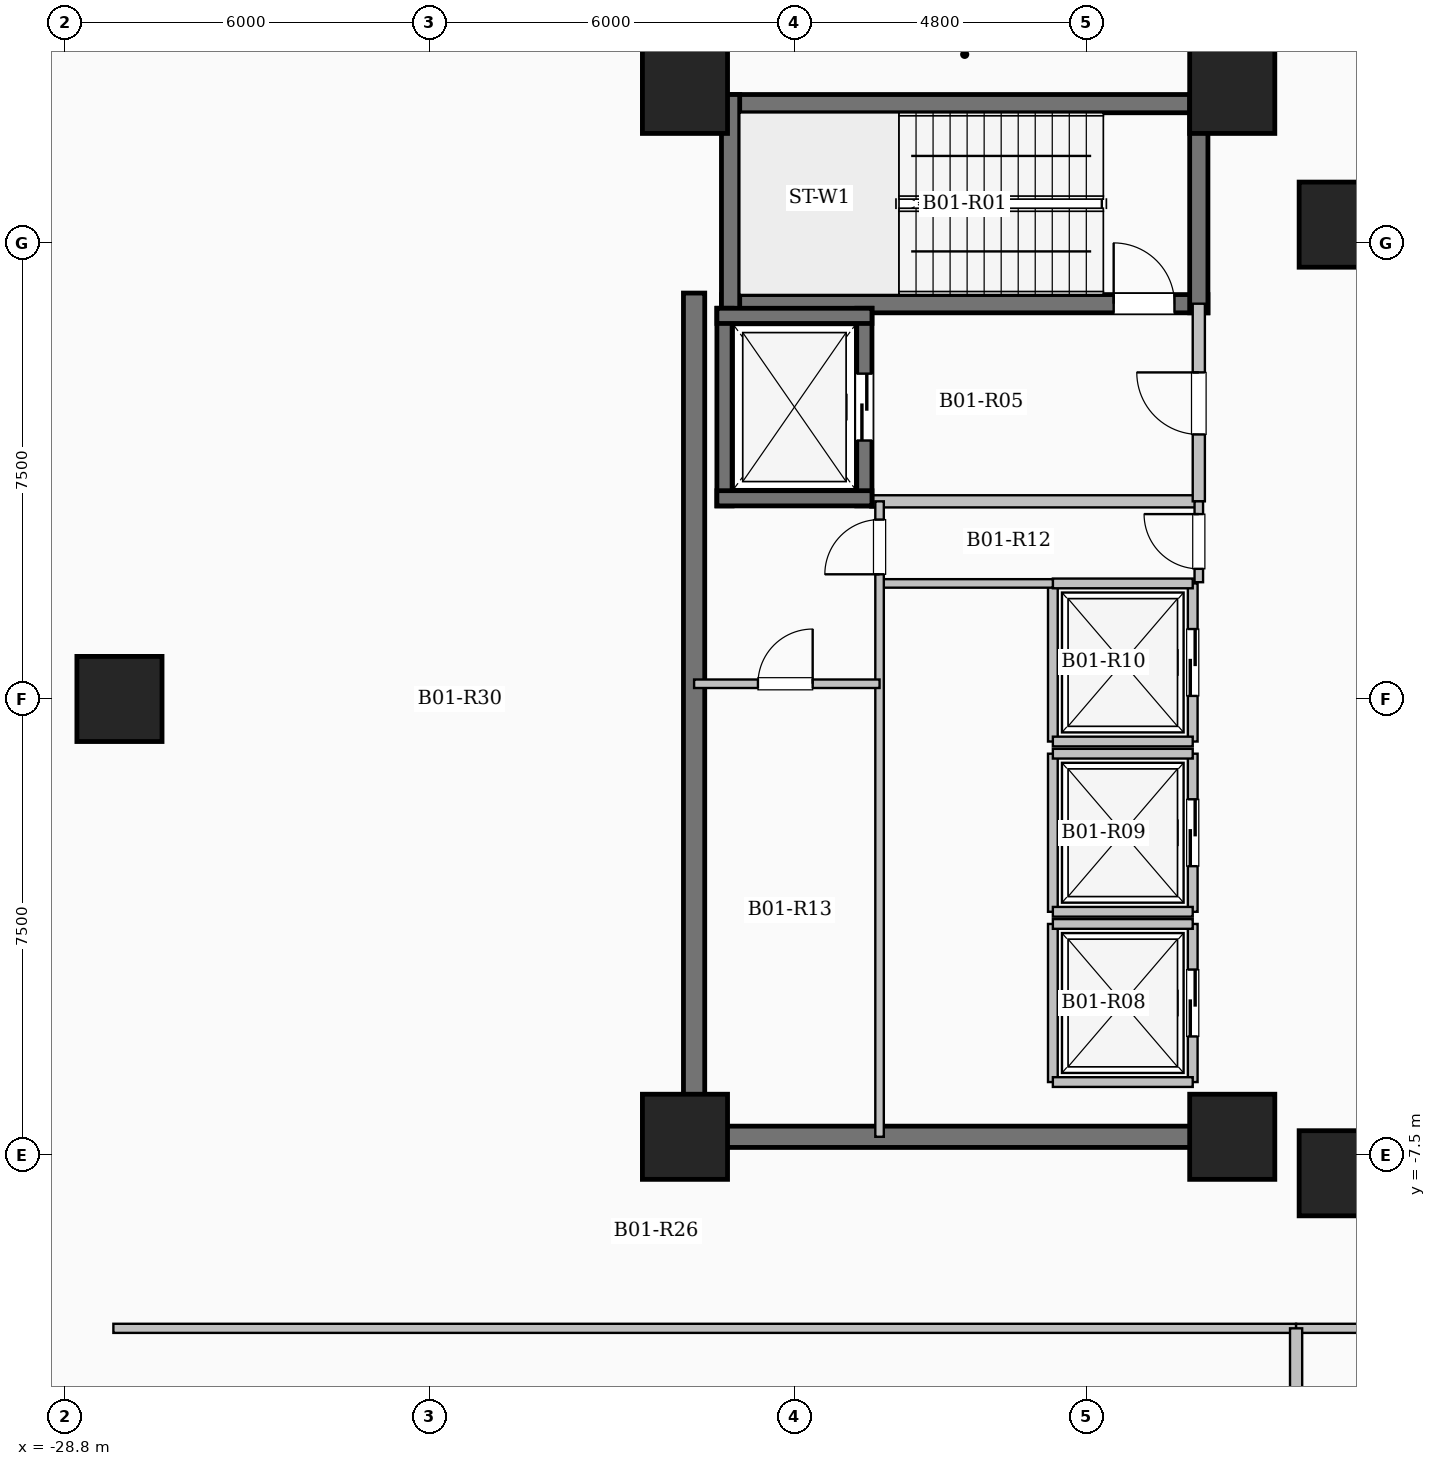
"""IFC4 building model, lengths in metres.
Left out: names, types, materials, properties, quantities, classifications, styles, units other than length and angle.
Written with IfcOpenShell. Run it as: python <this file> out.ifc"""

import sys

from ifc_helpers import new_model, si_unit, direction, frame, frame_2d, origin, origin_2d, place, context, subcontext, project, spatial, rectangle, extrude, element, fill, save


model = new_model("IFC4")
c1 = context("Model", 3, precision=1e-05, world=origin(), true_north=direction((0.0, 1.0)))
c2 = subcontext(c1, "Body", "Model", "MODEL_VIEW")
j1 = project(units=[si_unit("LENGTHUNIT", "METRE"), si_unit("PLANEANGLEUNIT", "RADIAN")], contexts=[c1])
p1 = place(None, origin())
s1 = spatial("IfcSite", under=j1, at=p1, CompositionType="ELEMENT")
p2 = place(p1, origin())
s2 = spatial("IfcBuilding", under=s1, at=p2, CompositionType="ELEMENT")
p3 = place(p2, frame((0.0, 0.0, -4.6)))
s3 = spatial("IfcBuildingStorey", under=s2, at=p3, CompositionType="ELEMENT", Elevation=-4.6)
for number, where, z_axis, x_axis in (
    (1, (-7.8, -7.8, 0.0), (0.0, 0.0, 1.0), (1.0, 0.0, 0.0)),
    (2, (-7.8, 7.8, 0.0), (0.0, 0.0, 1.0), (1.0, 0.0, 0.0)),
    (3, (-9.6, -7.2, 0.0), (0.0, 0.0, 1.0), (1.0, 0.0, 0.0)),
    (4, (-9.6, 10.0, 0.0), (0.0, 0.0, 1.0), (1.0, 0.0, 0.0)),
    (5, (-18.6, -7.2, 0.0), (0.0, 0.0, 1.0), (1.0, 0.0, 0.0)),
    (6, (-18.6, 10.0, 0.0), (0.0, 0.0, 1.0), (1.0, 0.0, 0.0)),
    (7, (-27.9, 0.0, 0.0), (0.0, 0.0, 1.0), (1.0, 0.0, 0.0)),
):
    element("IfcColumn", number, at=place(p3, frame(where, z_axis=z_axis, x_axis=x_axis)), inside=s3, PredefinedType="COLUMN", context=c2, shape_type="SweptSolid", body=[
        extrude(rectangle(XDim=1.4, YDim=1.4, at=origin_2d()), origin(), (0.0, 0.0, 1.0), 4.6),
    ])
p4 = place(p3, frame((-18.0, 9.79, 0.0), z_axis=(0.0, 0.0, 1.0), x_axis=(1.0, 0.0, 0.0)))
e8 = element("IfcWall", 8, at=p4, inside=s3, PredefinedType="SHEAR", context=c2, shape_type="SweptSolid", body=[
    extrude(rectangle(XDim=8.0, YDim=0.3, at=frame_2d((4.0, 0.0))), origin(), (0.0, 0.0, 1.0), 4.6),
])
p5 = place(p3, frame((-18.0, 6.5, 0.0), z_axis=(0.0, 0.0, 1.0), x_axis=(1.0, 0.0, 0.0)))
e9 = element("IfcWall", 9, at=p5, inside=s3, PredefinedType="SHEAR", context=c2, shape_type="SweptSolid", body=[
    extrude(rectangle(XDim=8.0, YDim=0.3, at=frame_2d((4.0, 0.0))), origin(), (0.0, 0.0, 1.0), 4.6),
])
p6 = place(p5, frame((6.45, 0.0, 0.0)))
e10 = element("IfcOpeningElement", 10, at=p6, cuts=e9, PredefinedType="OPENING", context=c2, shape_type="SweptSolid", body=[
    extrude(rectangle(XDim=1.0, YDim=2.15, at=frame_2d((0.5, 1.075))), frame((0.0, 0.16, 0.0), z_axis=(0.0, -1.0, 0.0), x_axis=(1.0, 0.0, 0.0)), (0.0, 0.0, 1.0), 0.32),
])
for number, where, z_axis, x_axis in (
    (11, (-17.85, 6.35, 0.0), (0.0, 0.0, 1.0), (0.0, 1.0, 0.0)),
    (12, (-10.15, 6.35, 0.0), (0.0, 0.0, 1.0), (0.0, 1.0, 0.0)),
):
    element("IfcWall", number, at=place(p3, frame(where, z_axis=z_axis, x_axis=x_axis)), inside=s3, PredefinedType="SHEAR", context=c2, shape_type="SweptSolid", body=[
        extrude(rectangle(XDim=3.59, YDim=0.3, at=frame_2d((1.795, 0.0))), origin(), (0.0, 0.0, 1.0), 4.6),
    ])
p7 = place(p3, frame((-15.55, 3.25, 0.0), z_axis=(0.0, 0.0, 1.0), x_axis=(1.0, 0.0, 0.0)))
e13 = element("IfcWall", 13, at=p7, inside=s3, PredefinedType="SOLIDWALL", context=c2, shape_type="SweptSolid", body=[
    extrude(rectangle(XDim=5.4, YDim=0.2, at=frame_2d((2.7, 0.0))), origin(), (0.0, 0.0, 1.0), 4.3),
])
p8 = place(p3, frame((-10.15, 3.25, 0.0), z_axis=(0.0, 0.0, 1.0), x_axis=(0.0, 1.0, 0.0)))
e14 = element("IfcWall", 14, at=p8, inside=s3, PredefinedType="SOLIDWALL", context=c2, shape_type="SweptSolid", body=[
    extrude(rectangle(XDim=3.25, YDim=0.2, at=frame_2d((1.625, 0.0))), origin(), (0.0, 0.0, 1.0), 4.3),
])
p9 = place(p8, frame((1.1, 0.0, 0.0)))
e15 = element("IfcOpeningElement", 15, at=p9, cuts=e14, PredefinedType="OPENING", context=c2, shape_type="SweptSolid", body=[
    extrude(rectangle(XDim=1.02, YDim=2.15, at=frame_2d((0.51, 1.075))), frame((0.0, 0.11, 0.0), z_axis=(0.0, -1.0, 0.0), x_axis=(1.0, 0.0, 0.0)), (0.0, 0.0, 1.0), 0.22),
])
p10 = place(p3, frame((-17.95, 3.175, 0.0), z_axis=(0.0, 0.0, 1.0), x_axis=(0.0, 1.0, 0.0)))
e16 = element("IfcWall", 16, at=p10, inside=s3, PredefinedType="SHEAR", context=c2, shape_type="SweptSolid", body=[
    extrude(rectangle(XDim=3.25, YDim=0.25, at=frame_2d((1.625, 0.0))), origin(), (0.0, 0.0, 1.0), 4.6),
])
p11 = place(p3, frame((-15.65, 3.175, 0.0), z_axis=(0.0, 0.0, 1.0), x_axis=(0.0, 1.0, 0.0)))
e17 = element("IfcWall", 17, at=p11, inside=s3, PredefinedType="SHEAR", context=c2, shape_type="SweptSolid", body=[
    extrude(rectangle(XDim=3.25, YDim=0.25, at=frame_2d((1.625, 0.0))), origin(), (0.0, 0.0, 1.0), 4.6),
])
p12 = place(p11, frame((1.075, 0.0, 0.0)))
e18 = element("IfcOpeningElement", 18, at=p12, cuts=e17, PredefinedType="OPENING", context=c2, shape_type="SweptSolid", body=[
    extrude(rectangle(XDim=1.1, YDim=2.15, at=frame_2d((0.55, 1.075))), frame((0.0, 0.135, 0.0), z_axis=(0.0, -1.0, 0.0), x_axis=(1.0, 0.0, 0.0)), (0.0, 0.0, 1.0), 0.27),
])
for number, where, z_axis, x_axis in (
    (19, (-18.075, 3.3, 0.0), (0.0, 0.0, 1.0), (1.0, 0.0, 0.0)),
    (20, (-18.075, 6.3, 0.0), (0.0, 0.0, 1.0), (1.0, 0.0, 0.0)),
):
    element("IfcWall", number, at=place(p3, frame(where, z_axis=z_axis, x_axis=x_axis)), inside=s3, PredefinedType="SHEAR", context=c2, shape_type="SweptSolid", body=[
        extrude(rectangle(XDim=2.55, YDim=0.25, at=frame_2d((1.275, 0.0))), origin(), (0.0, 0.0, 1.0), 4.6),
    ])
p13 = place(p3, frame((-12.55, -6.3, 0.0), z_axis=(0.0, 0.0, 1.0), x_axis=(0.0, 1.0, 0.0)))
e21 = element("IfcWall", 21, at=p13, inside=s3, PredefinedType="SOLIDWALL", context=c2, shape_type="SweptSolid", body=[
    extrude(rectangle(XDim=2.6, YDim=0.16, at=frame_2d((1.3, 0.0))), origin(), (0.0, 0.0, 1.0), 4.3),
])
p14 = place(p3, frame((-10.25, -6.3, 0.0), z_axis=(0.0, 0.0, 1.0), x_axis=(0.0, 1.0, 0.0)))
e22 = element("IfcWall", 22, at=p14, inside=s3, PredefinedType="SOLIDWALL", context=c2, shape_type="SweptSolid", body=[
    extrude(rectangle(XDim=2.6, YDim=0.16, at=frame_2d((1.3, 0.0))), origin(), (0.0, 0.0, 1.0), 4.3),
])
p15 = place(p14, frame((0.75, 0.0, 0.0)))
e23 = element("IfcOpeningElement", 23, at=p15, cuts=e22, PredefinedType="OPENING", context=c2, shape_type="SweptSolid", body=[
    extrude(rectangle(XDim=1.1, YDim=2.15, at=frame_2d((0.55, 1.075))), frame((0.0, 0.09, 0.0), z_axis=(0.0, -1.0, 0.0), x_axis=(1.0, 0.0, 0.0)), (0.0, 0.0, 1.0), 0.18),
])
for number, where, z_axis, x_axis in (
    (24, (-12.55, -6.3, 0.0), (0.0, 0.0, 1.0), (1.0, 0.0, 0.0)),
    (25, (-12.55, -3.7, 0.0), (0.0, 0.0, 1.0), (1.0, 0.0, 0.0)),
):
    element("IfcWall", number, at=place(p3, frame(where, z_axis=z_axis, x_axis=x_axis)), inside=s3, PredefinedType="SOLIDWALL", context=c2, shape_type="SweptSolid", body=[
        extrude(rectangle(XDim=2.3, YDim=0.16, at=frame_2d((1.15, 0.0))), origin(), (0.0, 0.0, 1.0), 4.3),
    ])
p16 = place(p3, frame((-12.55, -3.5, 0.0), z_axis=(0.0, 0.0, 1.0), x_axis=(0.0, 1.0, 0.0)))
e26 = element("IfcWall", 26, at=p16, inside=s3, PredefinedType="SOLIDWALL", context=c2, shape_type="SweptSolid", body=[
    extrude(rectangle(XDim=2.6, YDim=0.16, at=frame_2d((1.3, 0.0))), origin(), (0.0, 0.0, 1.0), 4.3),
])
p17 = place(p3, frame((-10.25, -3.5, 0.0), z_axis=(0.0, 0.0, 1.0), x_axis=(0.0, 1.0, 0.0)))
e27 = element("IfcWall", 27, at=p17, inside=s3, PredefinedType="SOLIDWALL", context=c2, shape_type="SweptSolid", body=[
    extrude(rectangle(XDim=2.6, YDim=0.16, at=frame_2d((1.3, 0.0))), origin(), (0.0, 0.0, 1.0), 4.3),
])
p18 = place(p17, frame((0.75, 0.0, 0.0)))
e28 = element("IfcOpeningElement", 28, at=p18, cuts=e27, PredefinedType="OPENING", context=c2, shape_type="SweptSolid", body=[
    extrude(rectangle(XDim=1.1, YDim=2.15, at=frame_2d((0.55, 1.075))), frame((0.0, 0.09, 0.0), z_axis=(0.0, -1.0, 0.0), x_axis=(1.0, 0.0, 0.0)), (0.0, 0.0, 1.0), 0.18),
])
for number, where, z_axis, x_axis in (
    (29, (-12.55, -3.5, 0.0), (0.0, 0.0, 1.0), (1.0, 0.0, 0.0)),
    (30, (-12.55, -0.9, 0.0), (0.0, 0.0, 1.0), (1.0, 0.0, 0.0)),
):
    element("IfcWall", number, at=place(p3, frame(where, z_axis=z_axis, x_axis=x_axis)), inside=s3, PredefinedType="SOLIDWALL", context=c2, shape_type="SweptSolid", body=[
        extrude(rectangle(XDim=2.3, YDim=0.16, at=frame_2d((1.15, 0.0))), origin(), (0.0, 0.0, 1.0), 4.3),
    ])
p19 = place(p3, frame((-12.55, -0.7, 0.0), z_axis=(0.0, 0.0, 1.0), x_axis=(0.0, 1.0, 0.0)))
e31 = element("IfcWall", 31, at=p19, inside=s3, PredefinedType="SOLIDWALL", context=c2, shape_type="SweptSolid", body=[
    extrude(rectangle(XDim=2.6, YDim=0.16, at=frame_2d((1.3, 0.0))), origin(), (0.0, 0.0, 1.0), 4.3),
])
p20 = place(p3, frame((-10.25, -0.7, 0.0), z_axis=(0.0, 0.0, 1.0), x_axis=(0.0, 1.0, 0.0)))
e32 = element("IfcWall", 32, at=p20, inside=s3, PredefinedType="SOLIDWALL", context=c2, shape_type="SweptSolid", body=[
    extrude(rectangle(XDim=2.6, YDim=0.16, at=frame_2d((1.3, 0.0))), origin(), (0.0, 0.0, 1.0), 4.3),
])
p21 = place(p20, frame((0.75, 0.0, 0.0)))
e33 = element("IfcOpeningElement", 33, at=p21, cuts=e32, PredefinedType="OPENING", context=c2, shape_type="SweptSolid", body=[
    extrude(rectangle(XDim=1.1, YDim=2.15, at=frame_2d((0.55, 1.075))), frame((0.0, 0.09, 0.0), z_axis=(0.0, -1.0, 0.0), x_axis=(1.0, 0.0, 0.0)), (0.0, 0.0, 1.0), 0.18),
])
for number, where, z_axis, x_axis in (
    (34, (-12.55, -0.7, 0.0), (0.0, 0.0, 1.0), (1.0, 0.0, 0.0)),
    (35, (-12.55, 1.9, 0.0), (0.0, 0.0, 1.0), (1.0, 0.0, 0.0)),
):
    element("IfcWall", number, at=place(p3, frame(where, z_axis=z_axis, x_axis=x_axis)), inside=s3, PredefinedType="SOLIDWALL", context=c2, shape_type="SweptSolid", body=[
        extrude(rectangle(XDim=2.3, YDim=0.16, at=frame_2d((1.15, 0.0))), origin(), (0.0, 0.0, 1.0), 4.3),
    ])
p22 = place(p3, frame((-18.45, -7.375, 0.0), z_axis=(0.0, 0.0, 1.0), x_axis=(0.0, 1.0, 0.0)))
e36 = element("IfcWall", 36, at=p22, inside=s3, PredefinedType="SHEAR", context=c2, shape_type="SweptSolid", body=[
    extrude(rectangle(XDim=14.05, YDim=0.35, at=frame_2d((7.025, 0.0))), origin(), (0.0, 0.0, 1.0), 4.6),
])
p23 = place(p3, frame((-18.625, -7.2, 0.0), z_axis=(0.0, 0.0, 1.0), x_axis=(1.0, 0.0, 0.0)))
e37 = element("IfcWall", 37, at=p23, inside=s3, PredefinedType="SHEAR", context=c2, shape_type="SweptSolid", body=[
    extrude(rectangle(XDim=8.55, YDim=0.35, at=frame_2d((4.275, 0.0))), origin(), (0.0, 0.0, 1.0), 4.6),
])
p24 = place(p3, frame((-15.4, 1.9, 0.0), z_axis=(0.0, 0.0, 1.0), x_axis=(1.0, 0.0, 0.0)))
e38 = element("IfcWall", 38, at=p24, inside=s3, PredefinedType="PARTITIONING", context=c2, shape_type="SweptSolid", body=[
    extrude(rectangle(XDim=2.85, YDim=0.14, at=frame_2d((1.425, 0.0))), origin(), (0.0, 0.0, 1.0), 4.3),
])
p25 = place(p3, frame((-10.15, 1.92, 0.0), z_axis=(0.0, 0.0, 1.0), x_axis=(0.0, 1.0, 0.0)))
e39 = element("IfcWall", 39, at=p25, inside=s3, PredefinedType="PARTITIONING", context=c2, shape_type="SweptSolid", body=[
    extrude(rectangle(XDim=1.33, YDim=0.14, at=frame_2d((0.665, 0.0))), origin(), (0.0, 0.0, 1.0), 4.3),
])
p26 = place(p25, frame((0.22, 0.0, 0.0)))
e40 = element("IfcOpeningElement", 40, at=p26, cuts=e39, PredefinedType="OPENING", context=c2, shape_type="SweptSolid", body=[
    extrude(rectangle(XDim=0.9, YDim=2.08, at=frame_2d((0.45, 1.04))), frame((0.0, 0.08, 0.0), z_axis=(0.0, -1.0, 0.0), x_axis=(1.0, 0.0, 0.0)), (0.0, 0.0, 1.0), 0.16),
])
p27 = place(p3, frame((-15.4, -7.2, 0.0), z_axis=(0.0, 0.0, 1.0), x_axis=(0.0, 1.0, 0.0)))
e41 = element("IfcWall", 41, at=p27, inside=s3, PredefinedType="PARTITIONING", context=c2, shape_type="SweptSolid", body=[
    extrude(rectangle(XDim=10.45, YDim=0.14, at=frame_2d((5.225, 0.0))), origin(), (0.0, 0.0, 1.0), 4.3),
])
p28 = place(p27, frame((9.25, 0.0, 0.0)))
e42 = element("IfcOpeningElement", 42, at=p28, cuts=e41, PredefinedType="OPENING", context=c2, shape_type="SweptSolid", body=[
    extrude(rectangle(XDim=0.9, YDim=2.08, at=frame_2d((0.45, 1.04))), frame((0.0, 0.08, 0.0), z_axis=(0.0, -1.0, 0.0), x_axis=(1.0, 0.0, 0.0)), (0.0, 0.0, 1.0), 0.16),
])
p29 = place(p3, frame((-18.45, 0.25, 0.0), z_axis=(0.0, 0.0, 1.0), x_axis=(1.0, 0.0, 0.0)))
e43 = element("IfcWall", 43, at=p29, inside=s3, PredefinedType="PARTITIONING", context=c2, shape_type="SweptSolid", body=[
    extrude(rectangle(XDim=3.05, YDim=0.14, at=frame_2d((1.525, 0.0))), origin(), (0.0, 0.0, 1.0), 4.3),
])
p30 = place(p29, frame((1.05, 0.0, 0.0)))
e44 = element("IfcOpeningElement", 44, at=p30, cuts=e43, PredefinedType="OPENING", context=c2, shape_type="SweptSolid", body=[
    extrude(rectangle(XDim=0.9, YDim=2.08, at=frame_2d((0.45, 1.04))), frame((0.0, 0.08, 0.0), z_axis=(0.0, -1.0, 0.0), x_axis=(1.0, 0.0, 0.0)), (0.0, 0.0, 1.0), 0.16),
])
p31 = place(p3, frame((-28.0, -10.35, 0.0), z_axis=(0.0, 0.0, 1.0), x_axis=(1.0, 0.0, 0.0)))
e45 = element("IfcWall", 45, at=p31, inside=s3, PredefinedType="PARTITIONING", context=c2, shape_type="SweptSolid", body=[
    extrude(rectangle(XDim=19.45, YDim=0.15, at=frame_2d((9.725, 0.0))), origin(), (0.0, 0.0, 1.0), 4.3),
])
p32 = place(p3, frame((-8.55, -10.35, 0.0), z_axis=(0.0, 0.0, 1.0), x_axis=(1.0, 0.0, 0.0)))
e46 = element("IfcWall", 46, at=p32, inside=s3, PredefinedType="PARTITIONING", context=c2, shape_type="SweptSolid", body=[
    extrude(rectangle(XDim=17.1, YDim=0.15, at=frame_2d((8.55, 0.0))), origin(), (0.0, 0.0, 1.0), 4.3),
])
p33 = place(p32, frame((2.5, 0.0, 0.0)))
e47 = element("IfcOpeningElement", 47, at=p33, cuts=e46, PredefinedType="OPENING", context=c2, shape_type="SweptSolid", body=[
    extrude(rectangle(XDim=1.2, YDim=2.2, at=frame_2d((0.6, 1.1))), frame((0.0, 0.085, 0.0), z_axis=(0.0, -1.0, 0.0), x_axis=(1.0, 0.0, 0.0)), (0.0, 0.0, 1.0), 0.17),
])
p34 = place(p32, frame((11.0, 0.0, 0.0)))
e48 = element("IfcOpeningElement", 48, at=p34, cuts=e46, PredefinedType="OPENING", context=c2, shape_type="SweptSolid", body=[
    extrude(rectangle(XDim=1.2, YDim=2.2, at=frame_2d((0.6, 1.1))), frame((0.0, 0.085, 0.0), z_axis=(0.0, -1.0, 0.0), x_axis=(1.0, 0.0, 0.0)), (0.0, 0.0, 1.0), 0.17),
])
p35 = place(p3, frame((-8.55, -15.7, 0.0), z_axis=(0.0, 0.0, 1.0), x_axis=(0.0, 1.0, 0.0)))
e49 = element("IfcWall", 49, at=p35, inside=s3, PredefinedType="SOLIDWALL", context=c2, shape_type="SweptSolid", body=[
    extrude(rectangle(XDim=5.35, YDim=0.2, at=frame_2d((2.675, 0.0))), origin(), (0.0, 0.0, 1.0), 4.3),
])
p36 = place(p6, origin())
e50 = element("IfcDoor", 50, at=p36, inside=s3, OperationType="SINGLE_SWING_LEFT", PredefinedType="DOOR", context=c2, shape_type="SweptSolid", body=[
    extrude(rectangle(XDim=1.0, YDim=2.15, at=frame_2d((0.5, 1.075))), frame((0.0, 0.025, 0.0), z_axis=(0.0, -1.0, 0.0), x_axis=(1.0, 0.0, 0.0)), (0.0, 0.0, 1.0), 0.05),
])
fill(e10, e50)
p37 = place(p9, origin())
e51 = element("IfcDoor", 51, at=p37, inside=s3, OperationType="SINGLE_SWING_RIGHT", PredefinedType="DOOR", context=c2, shape_type="SweptSolid", body=[
    extrude(rectangle(XDim=1.02, YDim=2.15, at=frame_2d((0.51, 1.075))), frame((0.0, 0.025, 0.0), z_axis=(0.0, -1.0, 0.0), x_axis=(1.0, 0.0, 0.0)), (0.0, 0.0, 1.0), 0.05),
])
fill(e15, e51)
p38 = place(p12, origin())
e52 = element("IfcDoor", 52, at=p38, inside=s3, OperationType="SLIDING_TO_LEFT", PredefinedType="DOOR", context=c2, shape_type="SweptSolid", body=[
    extrude(rectangle(XDim=1.1, YDim=2.15, at=frame_2d((0.55, 1.075))), frame((0.0, 0.025, 0.0), z_axis=(0.0, -1.0, 0.0), x_axis=(1.0, 0.0, 0.0)), (0.0, 0.0, 1.0), 0.05),
])
fill(e18, e52)
p39 = place(p15, origin())
e53 = element("IfcDoor", 53, at=p39, inside=s3, OperationType="SLIDING_TO_LEFT", PredefinedType="DOOR", context=c2, shape_type="SweptSolid", body=[
    extrude(rectangle(XDim=1.1, YDim=2.15, at=frame_2d((0.55, 1.075))), frame((0.0, 0.025, 0.0), z_axis=(0.0, -1.0, 0.0), x_axis=(1.0, 0.0, 0.0)), (0.0, 0.0, 1.0), 0.05),
])
fill(e23, e53)
p40 = place(p18, origin())
e54 = element("IfcDoor", 54, at=p40, inside=s3, OperationType="SLIDING_TO_LEFT", PredefinedType="DOOR", context=c2, shape_type="SweptSolid", body=[
    extrude(rectangle(XDim=1.1, YDim=2.15, at=frame_2d((0.55, 1.075))), frame((0.0, 0.025, 0.0), z_axis=(0.0, -1.0, 0.0), x_axis=(1.0, 0.0, 0.0)), (0.0, 0.0, 1.0), 0.05),
])
fill(e28, e54)
p41 = place(p21, origin())
e55 = element("IfcDoor", 55, at=p41, inside=s3, OperationType="SLIDING_TO_LEFT", PredefinedType="DOOR", context=c2, shape_type="SweptSolid", body=[
    extrude(rectangle(XDim=1.1, YDim=2.15, at=frame_2d((0.55, 1.075))), frame((0.0, 0.025, 0.0), z_axis=(0.0, -1.0, 0.0), x_axis=(1.0, 0.0, 0.0)), (0.0, 0.0, 1.0), 0.05),
])
fill(e33, e55)
p42 = place(p26, origin())
e56 = element("IfcDoor", 56, at=p42, inside=s3, OperationType="SINGLE_SWING_RIGHT", PredefinedType="DOOR", context=c2, shape_type="SweptSolid", body=[
    extrude(rectangle(XDim=0.9, YDim=2.08, at=frame_2d((0.45, 1.04))), frame((0.0, 0.025, 0.0), z_axis=(0.0, -1.0, 0.0), x_axis=(1.0, 0.0, 0.0)), (0.0, 0.0, 1.0), 0.05),
])
fill(e40, e56)
p43 = place(p28, origin())
e57 = element("IfcDoor", 57, at=p43, inside=s3, OperationType="SINGLE_SWING_LEFT", PredefinedType="DOOR", context=c2, shape_type="SweptSolid", body=[
    extrude(rectangle(XDim=0.9, YDim=2.08, at=frame_2d((0.45, 1.04))), frame((0.0, 0.025, 0.0), z_axis=(0.0, -1.0, 0.0), x_axis=(1.0, 0.0, 0.0)), (0.0, 0.0, 1.0), 0.05),
])
fill(e42, e57)
p44 = place(p30, origin())
e58 = element("IfcDoor", 58, at=p44, inside=s3, OperationType="SINGLE_SWING_RIGHT", PredefinedType="DOOR", context=c2, shape_type="SweptSolid", body=[
    extrude(rectangle(XDim=0.9, YDim=2.08, at=frame_2d((0.45, 1.04))), frame((0.0, 0.025, 0.0), z_axis=(0.0, -1.0, 0.0), x_axis=(1.0, 0.0, 0.0)), (0.0, 0.0, 1.0), 0.05),
])
fill(e44, e58)
save(model, sys.argv[1])
